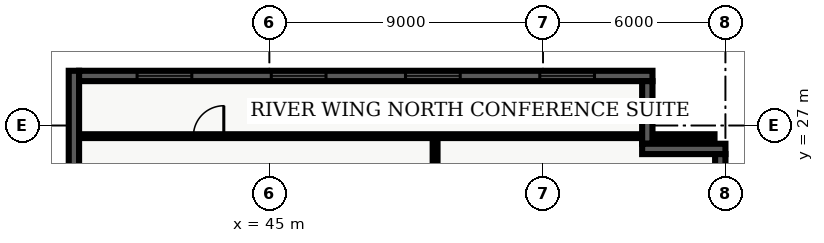
"""IFC4 building model, lengths in metres.
Left out: names, types, materials, properties, quantities, classifications, styles, units other than length and angle.
Written with IfcOpenShell. Run it as: python <this file> out.ifc"""

import sys

from ifc_helpers import new_model, entity, si_unit, converted_unit, direction, frame, origin_with_axes, origin_2d_with_axis, place, context, subcontext, project, spatial, polyline, rectangle, outline, extrude, element, fill, save


model = new_model("IFC4")
c1 = context("Model", 3, precision=1e-05, world=origin_with_axes(), true_north=direction((0.0, 1.0)))
c2 = subcontext(c1, "Body", "Model", "MODEL_VIEW")
j1 = project(units=[si_unit("LENGTHUNIT", "METRE"), converted_unit("PLANEANGLEUNIT", "DEGREE", entity("IfcPlaneAngleMeasure", 0.017), si_unit("PLANEANGLEUNIT", "RADIAN"), dimensions=[0, 0, 0, 0, 0, 0, 0])], contexts=[c1])
p1 = place(None, origin_with_axes())
s1 = spatial("IfcSite", under=j1, at=p1, CompositionType="ELEMENT")
p2 = place(p1, origin_with_axes())
s2 = spatial("IfcBuilding", under=s1, at=p2, CompositionType="ELEMENT")
p3 = place(p2, frame((0.0, 0.0, 129.0), z_axis=(0.0, 0.0, 1.0), x_axis=(1.0, 0.0, 0.0)))
s3 = spatial("IfcBuildingStorey", under=s2, at=p3, CompositionType="ELEMENT", Elevation=129.0)
p4 = place(p3, frame((50.45, 7.85, 0.0), z_axis=(0.0, 0.0, 1.0), x_axis=(0.0, 1.0, 0.0)))
e1 = element("IfcWall", 1, at=p4, inside=s3, PredefinedType="PARTITIONING", context=c2, shape_type="SweptSolid", body=[
    extrude(outline(polyline([(0.0, -0.08), (18.8, -0.08), (18.8, 0.08), (0.0, 0.08), (0.0, -0.08)])), origin_with_axes(), (0.0, 0.0, 1.0), 2.7),
])
p5 = place(p4, frame((7.75, 0.0, 0.0), z_axis=(0.0, 0.0, 1.0), x_axis=(1.0, 0.0, 0.0)))
e2 = element("IfcOpeningElement", 2, at=p5, cuts=e1, PredefinedType="OPENING", context=c2, shape_type="SweptSolid", body=[
    extrude(rectangle(XDim=1.0, YDim=0.18, at=origin_2d_with_axis()), origin_with_axes(), (0.0, 0.0, 1.0), 2.15),
])
p6 = place(p3, frame((38.735, 26.65, 0.0), z_axis=(0.0, 0.0, 1.0), x_axis=(1.0, 0.0, 0.0)))
e3 = element("IfcWall", 3, at=p6, inside=s3, PredefinedType="PARTITIONING", context=c2, shape_type="SweptSolid", body=[
    extrude(outline(polyline([(0.0, -0.062), (20.905, -0.062), (20.905, 0.062), (0.0, 0.062), (0.0, -0.062)])), origin_with_axes(), (0.0, 0.0, 1.0), 2.7),
])
p7 = place(p6, frame((4.265, 0.0, 0.0), z_axis=(0.0, 0.0, 1.0), x_axis=(1.0, 0.0, 0.0)))
e4 = element("IfcOpeningElement", 4, at=p7, cuts=e3, PredefinedType="OPENING", context=c2, shape_type="SweptSolid", body=[
    extrude(rectangle(XDim=1.0, YDim=0.145, at=origin_2d_with_axis()), origin_with_axes(), (0.0, 0.0, 1.0), 2.15),
])
p8 = place(p3, frame((38.57, 21.26, 0.0), z_axis=(0.0, 0.0, 1.0), x_axis=(0.0, 1.0, 0.0)))
e5 = element("IfcWall", 5, at=p8, inside=s3, PredefinedType="SOLIDWALL", context=c2, shape_type="SweptSolid", body=[
    extrude(outline(polyline([(0.0, -0.17), (7.54, -0.17), (7.54, 0.17), (0.0, 0.17), (0.0, -0.17)])), origin_with_axes(), (0.0, 0.0, 1.0), 3.66),
])
p9 = place(p3, frame((38.74, 28.63, 0.0), z_axis=(0.0, 0.0, 1.0), x_axis=(1.0, 0.0, 0.0)))
e6 = element("IfcWall", 6, at=p9, inside=s3, PredefinedType="SOLIDWALL", context=c2, shape_type="SweptSolid", body=[
    extrude(outline(polyline([(0.0, -0.17), (18.86, -0.17), (18.86, 0.17), (0.0, 0.17), (0.0, -0.17)])), origin_with_axes(), (0.0, 0.0, 1.0), 3.66),
])
p10 = place(p9, frame((2.808, 0.0, 0.45), z_axis=(0.0, 0.0, 1.0), x_axis=(1.0, 0.0, 0.0)))
e7 = element("IfcOpeningElement", 7, at=p10, cuts=e6, PredefinedType="OPENING", context=c2, shape_type="SweptSolid", body=[
    extrude(rectangle(XDim=1.8, YDim=0.36, at=origin_2d_with_axis()), origin_with_axes(), (0.0, 0.0, 1.0), 2.1),
])
p11 = place(p9, frame((7.222, 0.0, 0.45), z_axis=(0.0, 0.0, 1.0), x_axis=(1.0, 0.0, 0.0)))
e8 = element("IfcOpeningElement", 8, at=p11, cuts=e6, PredefinedType="OPENING", context=c2, shape_type="SweptSolid", body=[
    extrude(rectangle(XDim=1.8, YDim=0.36, at=origin_2d_with_axis()), origin_with_axes(), (0.0, 0.0, 1.0), 2.1),
])
p12 = place(p9, frame((11.637, 0.0, 0.45), z_axis=(0.0, 0.0, 1.0), x_axis=(1.0, 0.0, 0.0)))
e9 = element("IfcOpeningElement", 9, at=p12, cuts=e6, PredefinedType="OPENING", context=c2, shape_type="SweptSolid", body=[
    extrude(rectangle(XDim=1.8, YDim=0.36, at=origin_2d_with_axis()), origin_with_axes(), (0.0, 0.0, 1.0), 2.1),
])
p13 = place(p9, frame((16.053, 0.0, 0.45), z_axis=(0.0, 0.0, 1.0), x_axis=(1.0, 0.0, 0.0)))
e10 = element("IfcOpeningElement", 10, at=p13, cuts=e6, PredefinedType="OPENING", context=c2, shape_type="SweptSolid", body=[
    extrude(rectangle(XDim=1.8, YDim=0.36, at=origin_2d_with_axis()), origin_with_axes(), (0.0, 0.0, 1.0), 2.1),
])
p14 = place(p3, frame((57.43, 28.46, 0.0), z_axis=(0.0, 0.0, 1.0), x_axis=(0.0, -1.0, 0.0)))
e11 = element("IfcWall", 11, at=p14, inside=s3, PredefinedType="SOLIDWALL", context=c2, shape_type="SweptSolid", body=[
    extrude(outline(polyline([(0.0, -0.17), (2.06, -0.17), (2.06, 0.17), (0.0, 0.17), (0.0, -0.17)])), origin_with_axes(), (0.0, 0.0, 1.0), 3.66),
])
p15 = place(p3, frame((57.26, 26.23, 0.0), z_axis=(0.0, 0.0, 1.0), x_axis=(1.0, 0.0, 0.0)))
e12 = element("IfcWall", 12, at=p15, inside=s3, PredefinedType="SOLIDWALL", context=c2, shape_type="SweptSolid", body=[
    extrude(outline(polyline([(0.0, -0.17), (2.74, -0.17), (2.74, 0.17), (0.0, 0.17), (0.0, -0.17)])), origin_with_axes(), (0.0, 0.0, 1.0), 3.66),
])
p16 = place(p3, frame((59.83, 26.06, 0.0), z_axis=(0.0, 0.0, 1.0), x_axis=(0.0, -1.0, 0.0)))
e13 = element("IfcWall", 13, at=p16, inside=s3, PredefinedType="SOLIDWALL", context=c2, shape_type="SweptSolid", body=[
    extrude(outline(polyline([(0.0, -0.17), (23.66, -0.17), (23.66, 0.17), (0.0, 0.17), (0.0, -0.17)])), origin_with_axes(), (0.0, 0.0, 1.0), 3.66),
])
p17 = place(p16, frame((3.696, 0.0, 0.45), z_axis=(0.0, 0.0, 1.0), x_axis=(1.0, 0.0, 0.0)))
e14 = element("IfcOpeningElement", 14, at=p17, cuts=e13, PredefinedType="OPENING", context=c2, shape_type="SweptSolid", body=[
    extrude(rectangle(XDim=1.8, YDim=0.36, at=origin_2d_with_axis()), origin_with_axes(), (0.0, 0.0, 1.0), 2.1),
])
p18 = place(p16, frame((11.83, 0.0, 0.45), z_axis=(0.0, 0.0, 1.0), x_axis=(1.0, 0.0, 0.0)))
e15 = element("IfcOpeningElement", 15, at=p18, cuts=e13, PredefinedType="OPENING", context=c2, shape_type="SweptSolid", body=[
    extrude(rectangle(XDim=1.8, YDim=0.36, at=origin_2d_with_axis()), origin_with_axes(), (0.0, 0.0, 1.0), 2.1),
])
p19 = place(p16, frame((20.364, 0.0, 0.45), z_axis=(0.0, 0.0, 1.0), x_axis=(1.0, 0.0, 0.0)))
e16 = element("IfcOpeningElement", 16, at=p19, cuts=e13, PredefinedType="OPENING", context=c2, shape_type="SweptSolid", body=[
    extrude(rectangle(XDim=1.8, YDim=0.36, at=origin_2d_with_axis()), origin_with_axes(), (0.0, 0.0, 1.0), 2.1),
])
p20 = place(p6, frame((4.265, 0.0, 0.0), z_axis=(0.0, 0.0, 1.0), x_axis=(1.0, 0.0, 0.0)))
e17 = element("IfcDoor", 17, at=p20, inside=s3, OperationType="SINGLE_SWING_RIGHT", PredefinedType="DOOR", context=c2, shape_type="SweptSolid", body=[
    extrude(rectangle(XDim=1.0, YDim=0.075, at=origin_2d_with_axis()), origin_with_axes(), (0.0, 0.0, 1.0), 2.15),
])
fill(e4, e17)
p21 = place(p9, frame((2.808, 0.0, 0.45), z_axis=(0.0, 0.0, 1.0), x_axis=(1.0, 0.0, 0.0)))
e18 = element("IfcWindow", 18, at=p21, inside=s3, PredefinedType="WINDOW", context=c2, shape_type="SweptSolid", body=[
    extrude(rectangle(XDim=1.8, YDim=0.09, at=origin_2d_with_axis()), origin_with_axes(), (0.0, 0.0, 1.0), 2.1),
])
fill(e7, e18)
p22 = place(p9, frame((7.222, 0.0, 0.45), z_axis=(0.0, 0.0, 1.0), x_axis=(1.0, 0.0, 0.0)))
e19 = element("IfcWindow", 19, at=p22, inside=s3, PredefinedType="WINDOW", context=c2, shape_type="SweptSolid", body=[
    extrude(rectangle(XDim=1.8, YDim=0.09, at=origin_2d_with_axis()), origin_with_axes(), (0.0, 0.0, 1.0), 2.1),
])
fill(e8, e19)
p23 = place(p9, frame((11.637, 0.0, 0.45), z_axis=(0.0, 0.0, 1.0), x_axis=(1.0, 0.0, 0.0)))
e20 = element("IfcWindow", 20, at=p23, inside=s3, PredefinedType="WINDOW", context=c2, shape_type="SweptSolid", body=[
    extrude(rectangle(XDim=1.8, YDim=0.09, at=origin_2d_with_axis()), origin_with_axes(), (0.0, 0.0, 1.0), 2.1),
])
fill(e9, e20)
p24 = place(p9, frame((16.053, 0.0, 0.45), z_axis=(0.0, 0.0, 1.0), x_axis=(1.0, 0.0, 0.0)))
e21 = element("IfcWindow", 21, at=p24, inside=s3, PredefinedType="WINDOW", context=c2, shape_type="SweptSolid", body=[
    extrude(rectangle(XDim=1.8, YDim=0.09, at=origin_2d_with_axis()), origin_with_axes(), (0.0, 0.0, 1.0), 2.1),
])
fill(e10, e21)
save(model, sys.argv[1])
